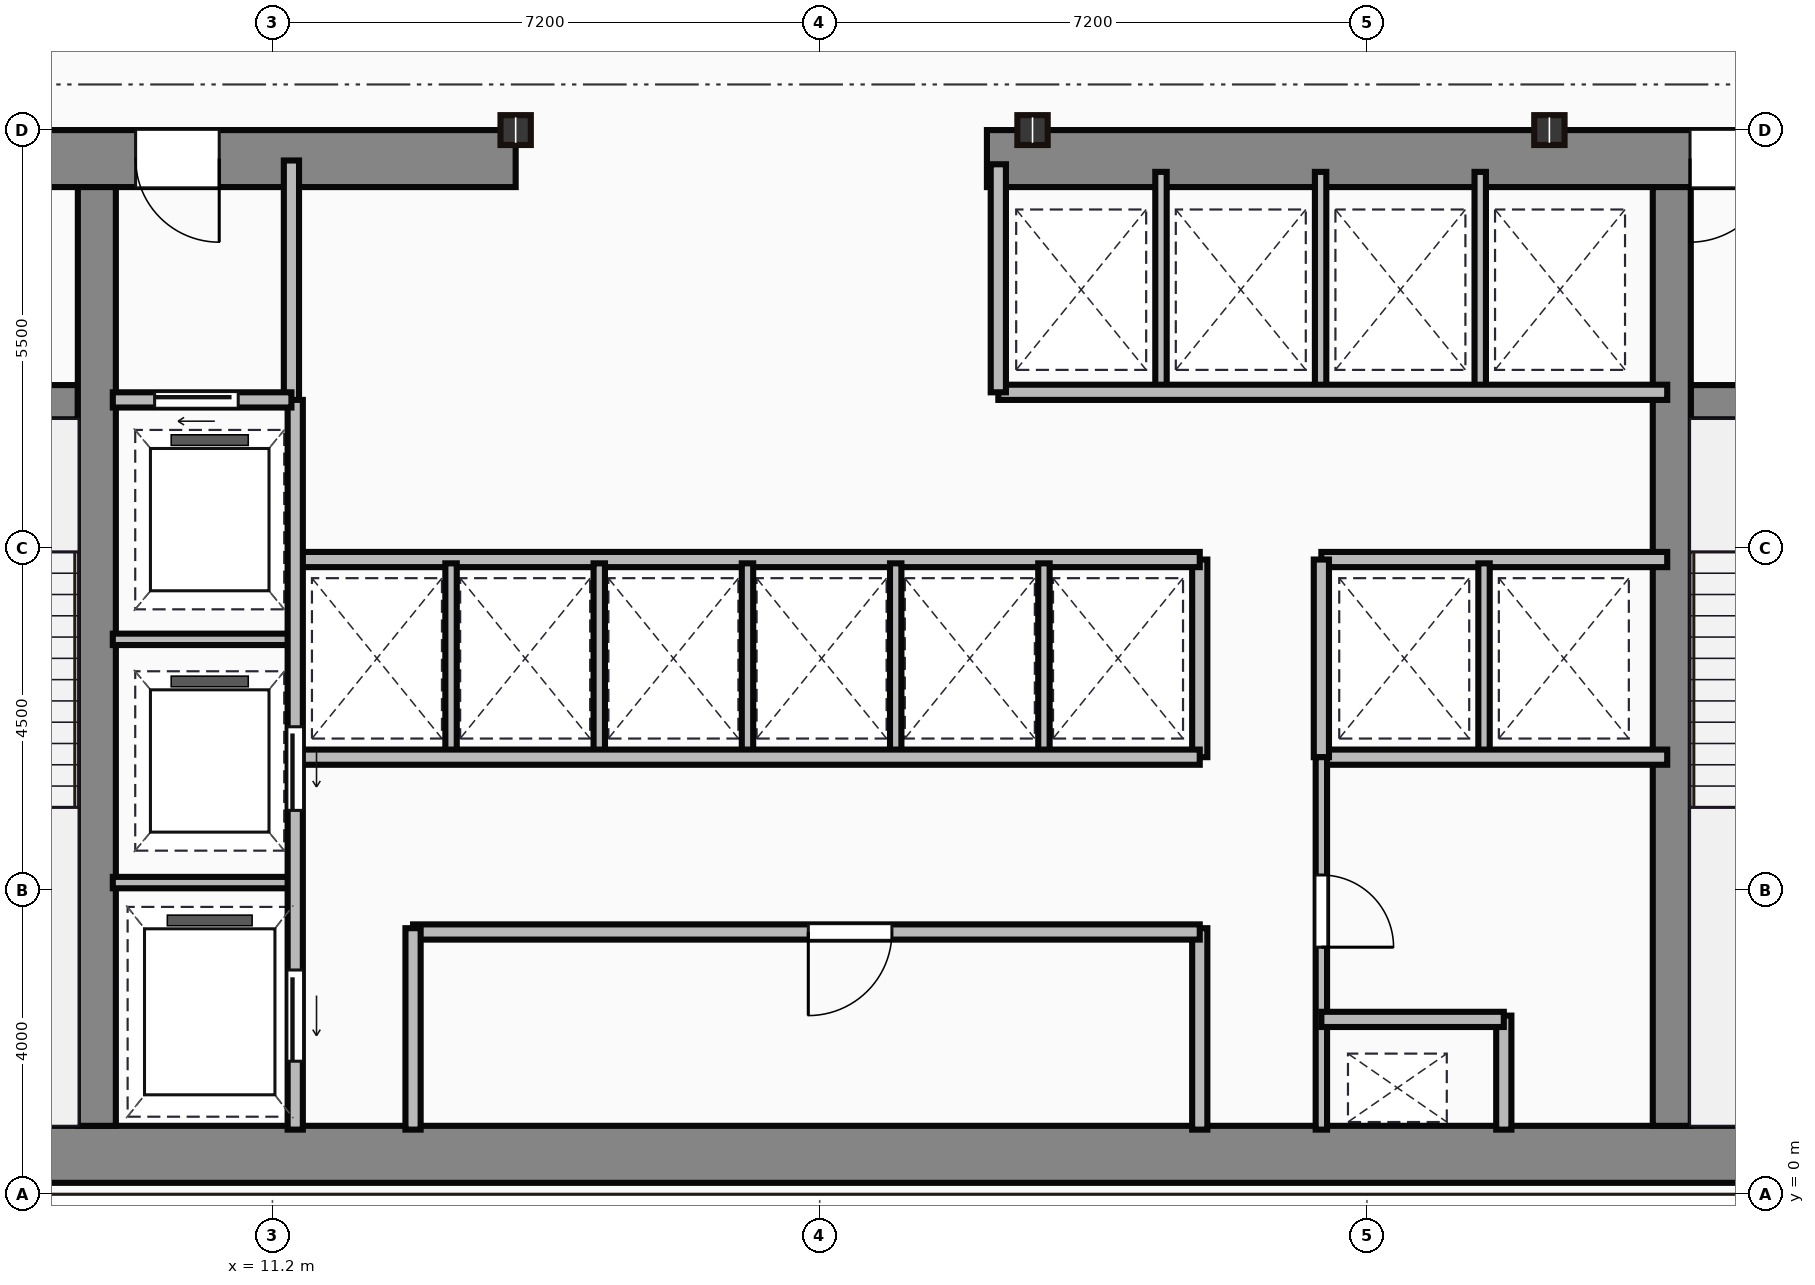
"""IFC4 building model, lengths in metres.
Left out: names, types, materials, properties, quantities, classifications, styles, units other than length and angle.
Written with IfcOpenShell. Run it as: python <this file> out.ifc"""

import sys

from ifc_helpers import new_model, si_unit, direction, frame, frame_2d, origin, origin_2d, place, context, subcontext, project, spatial, rectangle, i_section, extrude, source, transform, mapped, element, fill, save


model = new_model("IFC4")
c1 = context("Model", 3, precision=1e-05, world=origin(), true_north=direction((0.0, 1.0)))
c2 = subcontext(c1, "Body", "Model", "MODEL_VIEW")
j1 = project(units=[si_unit("LENGTHUNIT", "METRE"), si_unit("PLANEANGLEUNIT", "RADIAN")], contexts=[c1])
p1 = place(None, origin())
s1 = spatial("IfcSite", under=j1, at=p1, CompositionType="ELEMENT")
p2 = place(p1, origin())
s2 = spatial("IfcBuilding", under=s1, at=p2, CompositionType="ELEMENT")
p3 = place(p2, frame((0.0, 0.0, 136.1)))
s3 = spatial("IfcBuildingStorey", under=s2, at=p3, CompositionType="ELEMENT", Elevation=136.1)
m1 = source(origin(), c2, "Body", "SweptSolid", [
    extrude(rectangle(XDim=29.5, YDim=0.75, at=frame_2d((14.75, 0.0))), origin(), (0.0, 0.0, 1.0), 4.5),
])
p4 = place(p3, frame((4.5, 0.525, 0.0), z_axis=(0.0, 0.0, 1.0), x_axis=(1.0, 0.0, 0.0)))
e1 = element("IfcWall", 1, at=p4, inside=s3, PredefinedType="SHEAR", context=c2, shape_type="MappedRepresentation", body=[
    mapped(m1, transform((0.0, 0.0, 0.0))),
])
m2 = source(origin(), c2, "Body", "SweptSolid", [
    extrude(rectangle(XDim=9.1, YDim=0.75, at=frame_2d((4.55, 0.0))), origin(), (0.0, 0.0, 1.0), 4.5),
])
p5 = place(p3, frame((5.3, 13.625, 0.0), z_axis=(0.0, 0.0, 1.0), x_axis=(1.0, 0.0, 0.0)))
e2 = element("IfcWall", 2, at=p5, inside=s3, PredefinedType="SHEAR", context=c2, shape_type="MappedRepresentation", body=[
    mapped(m2, transform((0.0, 0.0, 0.0))),
])
p6 = place(p5, frame((4.1, 0.0, 0.0)))
e3 = element("IfcOpeningElement", 3, at=p6, cuts=e2, PredefinedType="OPENING", context=c2, shape_type="SweptSolid", body=[
    extrude(rectangle(XDim=1.1, YDim=2.15, at=frame_2d((0.55, 1.075))), frame((0.0, 0.385, 0.0), z_axis=(0.0, -1.0, 0.0), x_axis=(1.0, 0.0, 0.0)), (0.0, 0.0, 1.0), 0.77),
])
m3 = source(origin(), c2, "Body", "SweptSolid", [
    extrude(rectangle(XDim=12.6, YDim=0.75, at=frame_2d((6.3, 0.0))), origin(), (0.0, 0.0, 1.0), 4.5),
])
p7 = place(p3, frame((20.6, 13.625, 0.0), z_axis=(0.0, 0.0, 1.0), x_axis=(1.0, 0.0, 0.0)))
e4 = element("IfcWall", 4, at=p7, inside=s3, PredefinedType="SHEAR", context=c2, shape_type="MappedRepresentation", body=[
    mapped(m3, transform((0.0, 0.0, 0.0))),
])
p8 = place(p7, frame((9.25, 0.0, 0.0)))
e5 = element("IfcOpeningElement", 5, at=p8, cuts=e4, PredefinedType="OPENING", context=c2, shape_type="SweptSolid", body=[
    extrude(rectangle(XDim=1.1, YDim=2.15, at=frame_2d((0.55, 1.075))), frame((0.0, 0.385, 0.0), z_axis=(0.0, -1.0, 0.0), x_axis=(1.0, 0.0, 0.0)), (0.0, 0.0, 1.0), 0.77),
])
m4 = source(origin(), c2, "Body", "SweptSolid", [
    extrude(rectangle(XDim=12.35, YDim=0.5, at=frame_2d((6.175, 0.0))), origin(), (0.0, 0.0, 1.0), 4.5),
])
for number, where, z_axis, x_axis in (
    (6, (8.89, 0.9, 0.0), (0.0, 0.0, 1.0), (0.0, 1.0, 0.0)),
    (7, (29.61, 0.9, 0.0), (0.0, 0.0, 1.0), (0.0, 1.0, 0.0)),
):
    element("IfcWall", number, at=place(p3, frame(where, z_axis=z_axis, x_axis=x_axis)), inside=s3, PredefinedType="SHEAR", context=c2, shape_type="MappedRepresentation", body=[
        mapped(m4, transform((0.0, 0.0, 0.0))),
    ])
m5 = source(origin(), c2, "Body", "SweptSolid", [
    extrude(rectangle(XDim=3.39, YDim=0.45, at=frame_2d((1.695, 0.0))), origin(), (0.0, 0.0, 1.0), 4.5),
])
p9 = place(p3, frame((5.25, 10.42, 0.0), z_axis=(0.0, 0.0, 1.0), x_axis=(1.0, 0.0, 0.0)))
e8 = element("IfcWall", 8, at=p9, inside=s3, PredefinedType="SHEAR", context=c2, shape_type="MappedRepresentation", body=[
    mapped(m5, transform((0.0, 0.0, 0.0))),
])
p10 = place(p9, frame((1.05, 0.0, 0.0)))
e9 = element("IfcOpeningElement", 9, at=p10, cuts=e8, PredefinedType="OPENING", context=c2, shape_type="SweptSolid", body=[
    extrude(rectangle(XDim=1.1, YDim=2.15, at=frame_2d((0.55, 1.075))), frame((0.0, 0.235, 0.0), z_axis=(0.0, -1.0, 0.0), x_axis=(1.0, 0.0, 0.0)), (0.0, 0.0, 1.0), 0.47),
])
p11 = place(p3, frame((29.86, 10.42, 0.0), z_axis=(0.0, 0.0, 1.0), x_axis=(1.0, 0.0, 0.0)))
e10 = element("IfcWall", 10, at=p11, inside=s3, PredefinedType="SHEAR", context=c2, shape_type="MappedRepresentation", body=[
    mapped(m5, transform((0.0, 0.0, 0.0))),
])
p12 = place(p11, frame((1.1, 0.0, 0.0)))
e11 = element("IfcOpeningElement", 11, at=p12, cuts=e10, PredefinedType="OPENING", context=c2, shape_type="SweptSolid", body=[
    extrude(rectangle(XDim=1.1, YDim=2.15, at=frame_2d((0.55, 1.075))), frame((0.0, 0.235, 0.0), z_axis=(0.0, -1.0, 0.0), x_axis=(1.0, 0.0, 0.0)), (0.0, 0.0, 1.0), 0.47),
])
m6 = source(origin(), c2, "Body", "SweptSolid", [
    extrude(i_section(OverallWidth=0.399, OverallDepth=0.393, WebThickness=0.023, FlangeThickness=0.037, at=origin_2d()), origin(), (0.0, 0.0, 1.0), 4.5),
])
for number, where, z_axis, x_axis in (
    (12, (14.4, 14.0, 0.0), (0.0, 0.0, 1.0), (1.0, 0.0, 0.0)),
    (13, (21.2, 14.0, 0.0), (0.0, 0.0, 1.0), (1.0, 0.0, 0.0)),
    (14, (28.0, 14.0, 0.0), (0.0, 0.0, 1.0), (1.0, 0.0, 0.0)),
):
    element("IfcColumn", number, at=place(p3, frame(where, z_axis=z_axis, x_axis=x_axis)), inside=s3, PredefinedType="COLUMN", context=c2, shape_type="MappedRepresentation", body=[
        mapped(m6, transform((0.0, 0.0, 0.0))),
    ])
m7 = source(origin(), c2, "Body", "SweptSolid", [
    extrude(rectangle(XDim=3.18, YDim=0.2, at=frame_2d((1.59, 0.0))), origin(), (0.0, 0.0, 1.0), 4.25),
])
p13 = place(p3, frame((11.45, 10.42, 0.0), z_axis=(0.0, 0.0, 1.0), x_axis=(0.0, 1.0, 0.0)))
e15 = element("IfcWall", 15, at=p13, inside=s3, PredefinedType="PARTITIONING", context=c2, shape_type="MappedRepresentation", body=[
    mapped(m7, transform((0.0, 0.0, 0.0))),
])
m8 = source(origin(), c2, "Body", "SweptSolid", [
    extrude(rectangle(XDim=2.35, YDim=0.2, at=frame_2d((1.175, 0.0))), origin(), (0.0, 0.0, 1.0), 4.25),
])
p14 = place(p3, frame((9.1, 10.45, 0.0), z_axis=(0.0, 0.0, 1.0), x_axis=(1.0, 0.0, 0.0)))
e16 = element("IfcWall", 16, at=p14, inside=s3, PredefinedType="PARTITIONING", context=c2, shape_type="MappedRepresentation", body=[
    mapped(m8, transform((0.0, 0.0, 0.0))),
])
p15 = place(p14, frame((0.55, 0.0, 0.0)))
e17 = element("IfcOpeningElement", 17, at=p15, cuts=e16, PredefinedType="OPENING", context=c2, shape_type="SweptSolid", body=[
    extrude(rectangle(XDim=1.1, YDim=2.15, at=frame_2d((0.55, 1.075))), frame((0.0, 0.11, 0.0), z_axis=(0.0, -1.0, 0.0), x_axis=(1.0, 0.0, 0.0)), (0.0, 0.0, 1.0), 0.22),
])
m9 = source(origin(), c2, "Body", "SweptSolid", [
    extrude(rectangle(XDim=9.6, YDim=0.2, at=frame_2d((4.8, 0.0))), origin(), (0.0, 0.0, 1.0), 4.25),
])
p16 = place(p3, frame((11.5, 0.85, 0.0), z_axis=(0.0, 0.0, 1.0), x_axis=(0.0, 1.0, 0.0)))
e18 = element("IfcWall", 18, at=p16, inside=s3, PredefinedType="PARTITIONING", context=c2, shape_type="MappedRepresentation", body=[
    mapped(m9, transform((0.0, 0.0, 0.0))),
])
p17 = place(p16, frame((4.2, 0.0, 0.0)))
e19 = element("IfcOpeningElement", 19, at=p17, cuts=e18, PredefinedType="OPENING", context=c2, shape_type="SweptSolid", body=[
    extrude(rectangle(XDim=1.1, YDim=2.15, at=frame_2d((0.55, 1.075))), frame((0.0, 0.11, 0.0), z_axis=(0.0, -1.0, 0.0), x_axis=(1.0, 0.0, 0.0)), (0.0, 0.0, 1.0), 0.22),
])
p18 = place(p16, frame((0.9, 0.0, 0.0)))
e20 = element("IfcOpeningElement", 20, at=p18, cuts=e18, PredefinedType="OPENING", context=c2, shape_type="SweptSolid", body=[
    extrude(rectangle(XDim=1.2, YDim=2.15, at=frame_2d((0.6, 1.075))), frame((0.0, 0.11, 0.0), z_axis=(0.0, -1.0, 0.0), x_axis=(1.0, 0.0, 0.0)), (0.0, 0.0, 1.0), 0.22),
])
m10 = source(origin(), c2, "Body", "SweptSolid", [
    extrude(rectangle(XDim=2.4, YDim=0.15, at=frame_2d((1.2, 0.0))), origin(), (0.0, 0.0, 1.0), 4.25),
])
for number, where, z_axis, x_axis in (
    (21, (9.1, 4.1, 0.0), (0.0, 0.0, 1.0), (1.0, 0.0, 0.0)),
    (22, (9.1, 7.3, 0.0), (0.0, 0.0, 1.0), (1.0, 0.0, 0.0)),
):
    element("IfcWall", number, at=place(p3, frame(where, z_axis=z_axis, x_axis=x_axis)), inside=s3, PredefinedType="PARTITIONING", context=c2, shape_type="MappedRepresentation", body=[
        mapped(m10, transform((0.0, 0.0, 0.0))),
    ])
m11 = source(origin(), c2, "Body", "SweptSolid", [
    extrude(rectangle(XDim=2.65, YDim=0.2, at=frame_2d((1.325, 0.0))), origin(), (0.0, 0.0, 1.0), 4.25),
])
p19 = place(p3, frame((13.05, 0.85, 0.0), z_axis=(0.0, 0.0, 1.0), x_axis=(0.0, 1.0, 0.0)))
e23 = element("IfcWall", 23, at=p19, inside=s3, PredefinedType="PARTITIONING", context=c2, shape_type="MappedRepresentation", body=[
    mapped(m11, transform((0.0, 0.0, 0.0))),
])
m12 = source(origin(), c2, "Body", "SweptSolid", [
    extrude(rectangle(XDim=10.35, YDim=0.2, at=frame_2d((5.175, 0.0))), origin(), (0.0, 0.0, 1.0), 4.25),
])
p20 = place(p3, frame((13.05, 3.45, 0.0), z_axis=(0.0, 0.0, 1.0), x_axis=(1.0, 0.0, 0.0)))
e24 = element("IfcWall", 24, at=p20, inside=s3, PredefinedType="PARTITIONING", context=c2, shape_type="MappedRepresentation", body=[
    mapped(m12, transform((0.0, 0.0, 0.0))),
])
p21 = place(p20, frame((5.2, 0.0, 0.0)))
e25 = element("IfcOpeningElement", 25, at=p21, cuts=e24, PredefinedType="OPENING", context=c2, shape_type="SweptSolid", body=[
    extrude(rectangle(XDim=1.1, YDim=2.15, at=frame_2d((0.55, 1.075))), frame((0.0, 0.11, 0.0), z_axis=(0.0, -1.0, 0.0), x_axis=(1.0, 0.0, 0.0)), (0.0, 0.0, 1.0), 0.22),
])
p22 = place(p3, frame((23.4, 0.85, 0.0), z_axis=(0.0, 0.0, 1.0), x_axis=(0.0, 1.0, 0.0)))
e26 = element("IfcWall", 26, at=p22, inside=s3, PredefinedType="PARTITIONING", context=c2, shape_type="MappedRepresentation", body=[
    mapped(m11, transform((0.0, 0.0, 0.0))),
])
m13 = source(origin(), c2, "Body", "SweptSolid", [
    extrude(rectangle(XDim=11.85, YDim=0.2, at=frame_2d((5.925, 0.0))), origin(), (0.0, 0.0, 1.0), 4.25),
])
for number, where, z_axis, x_axis in (
    (27, (11.55, 5.75, 0.0), (0.0, 0.0, 1.0), (1.0, 0.0, 0.0)),
    (28, (11.55, 8.35, 0.0), (0.0, 0.0, 1.0), (1.0, 0.0, 0.0)),
):
    element("IfcWall", number, at=place(p3, frame(where, z_axis=z_axis, x_axis=x_axis)), inside=s3, PredefinedType="PARTITIONING", context=c2, shape_type="MappedRepresentation", body=[
        mapped(m13, transform((0.0, 0.0, 0.0))),
    ])
m14 = source(origin(), c2, "Body", "SweptSolid", [
    extrude(rectangle(XDim=2.6, YDim=0.2, at=frame_2d((1.3, 0.0))), origin(), (0.0, 0.0, 1.0), 4.25),
])
p23 = place(p3, frame((23.4, 5.75, 0.0), z_axis=(0.0, 0.0, 1.0), x_axis=(0.0, 1.0, 0.0)))
e29 = element("IfcWall", 29, at=p23, inside=s3, PredefinedType="PARTITIONING", context=c2, shape_type="MappedRepresentation", body=[
    mapped(m14, transform((0.0, 0.0, 0.0))),
])
m15 = source(origin(), c2, "Body", "SweptSolid", [
    extrude(rectangle(XDim=2.5, YDim=0.15, at=frame_2d((1.25, 0.0))), origin(), (0.0, 0.0, 1.0), 4.25),
])
for number, where, z_axis, x_axis in (
    (30, (13.55, 5.8, 0.0), (0.0, 0.0, 1.0), (0.0, 1.0, 0.0)),
    (31, (15.5, 5.8, 0.0), (0.0, 0.0, 1.0), (0.0, 1.0, 0.0)),
    (32, (17.45, 5.8, 0.0), (0.0, 0.0, 1.0), (0.0, 1.0, 0.0)),
    (33, (19.4, 5.8, 0.0), (0.0, 0.0, 1.0), (0.0, 1.0, 0.0)),
    (34, (21.35, 5.8, 0.0), (0.0, 0.0, 1.0), (0.0, 1.0, 0.0)),
):
    element("IfcWall", number, at=place(p3, frame(where, z_axis=z_axis, x_axis=x_axis)), inside=s3, PredefinedType="PARTITIONING", context=c2, shape_type="MappedRepresentation", body=[
        mapped(m15, transform((0.0, 0.0, 0.0))),
    ])
m16 = source(origin(), c2, "Body", "SweptSolid", [
    extrude(rectangle(XDim=8.8, YDim=0.2, at=frame_2d((4.4, 0.0))), origin(), (0.0, 0.0, 1.0), 4.25),
])
p24 = place(p3, frame((20.75, 10.55, 0.0), z_axis=(0.0, 0.0, 1.0), x_axis=(1.0, 0.0, 0.0)))
e35 = element("IfcWall", 35, at=p24, inside=s3, PredefinedType="PARTITIONING", context=c2, shape_type="MappedRepresentation", body=[
    mapped(m16, transform((0.0, 0.0, 0.0))),
])
m17 = source(origin(), c2, "Body", "SweptSolid", [
    extrude(rectangle(XDim=3.0, YDim=0.2, at=frame_2d((1.5, 0.0))), origin(), (0.0, 0.0, 1.0), 4.25),
])
p25 = place(p3, frame((20.75, 10.55, 0.0), z_axis=(0.0, 0.0, 1.0), x_axis=(0.0, 1.0, 0.0)))
e36 = element("IfcWall", 36, at=p25, inside=s3, PredefinedType="PARTITIONING", context=c2, shape_type="MappedRepresentation", body=[
    mapped(m17, transform((0.0, 0.0, 0.0))),
])
m18 = source(origin(), c2, "Body", "SweptSolid", [
    extrude(rectangle(XDim=2.85, YDim=0.15, at=frame_2d((1.425, 0.0))), origin(), (0.0, 0.0, 1.0), 4.25),
])
for number, where, z_axis, x_axis in (
    (37, (22.89, 10.6, 0.0), (0.0, 0.0, 1.0), (0.0, 1.0, 0.0)),
    (38, (24.99, 10.6, 0.0), (0.0, 0.0, 1.0), (0.0, 1.0, 0.0)),
    (39, (27.09, 10.6, 0.0), (0.0, 0.0, 1.0), (0.0, 1.0, 0.0)),
):
    element("IfcWall", number, at=place(p3, frame(where, z_axis=z_axis, x_axis=x_axis)), inside=s3, PredefinedType="PARTITIONING", context=c2, shape_type="MappedRepresentation", body=[
        mapped(m18, transform((0.0, 0.0, 0.0))),
    ])
m19 = source(origin(), c2, "Body", "SweptSolid", [
    extrude(rectangle(XDim=4.55, YDim=0.2, at=frame_2d((2.275, 0.0))), origin(), (0.0, 0.0, 1.0), 4.25),
])
for number, where, z_axis, x_axis in (
    (40, (25.0, 8.35, 0.0), (0.0, 0.0, 1.0), (1.0, 0.0, 0.0)),
    (41, (25.0, 5.75, 0.0), (0.0, 0.0, 1.0), (1.0, 0.0, 0.0)),
):
    element("IfcWall", number, at=place(p3, frame(where, z_axis=z_axis, x_axis=x_axis)), inside=s3, PredefinedType="PARTITIONING", context=c2, shape_type="MappedRepresentation", body=[
        mapped(m19, transform((0.0, 0.0, 0.0))),
    ])
p26 = place(p3, frame((25.0, 5.75, 0.0), z_axis=(0.0, 0.0, 1.0), x_axis=(0.0, 1.0, 0.0)))
e42 = element("IfcWall", 42, at=p26, inside=s3, PredefinedType="PARTITIONING", context=c2, shape_type="MappedRepresentation", body=[
    mapped(m14, transform((0.0, 0.0, 0.0))),
])
p27 = place(p3, frame((27.14, 5.8, 0.0), z_axis=(0.0, 0.0, 1.0), x_axis=(0.0, 1.0, 0.0)))
e43 = element("IfcWall", 43, at=p27, inside=s3, PredefinedType="PARTITIONING", context=c2, shape_type="MappedRepresentation", body=[
    mapped(m15, transform((0.0, 0.0, 0.0))),
])
m20 = source(origin(), c2, "Body", "SweptSolid", [
    extrude(rectangle(XDim=4.9, YDim=0.15, at=frame_2d((2.45, 0.0))), origin(), (0.0, 0.0, 1.0), 4.25),
])
p28 = place(p3, frame((25.0, 0.85, 0.0), z_axis=(0.0, 0.0, 1.0), x_axis=(0.0, 1.0, 0.0)))
e44 = element("IfcWall", 44, at=p28, inside=s3, PredefinedType="PARTITIONING", context=c2, shape_type="MappedRepresentation", body=[
    mapped(m20, transform((0.0, 0.0, 0.0))),
])
p29 = place(p28, frame((2.4, 0.0, 0.0)))
e45 = element("IfcOpeningElement", 45, at=p29, cuts=e44, PredefinedType="OPENING", context=c2, shape_type="SweptSolid", body=[
    extrude(rectangle(XDim=0.95, YDim=2.15, at=frame_2d((0.475, 1.075))), frame((0.0, 0.085, 0.0), z_axis=(0.0, -1.0, 0.0), x_axis=(1.0, 0.0, 0.0)), (0.0, 0.0, 1.0), 0.17),
])
m21 = source(origin(), c2, "Body", "SweptSolid", [
    extrude(rectangle(XDim=2.4, YDim=0.2, at=frame_2d((1.2, 0.0))), origin(), (0.0, 0.0, 1.0), 4.25),
])
p30 = place(p3, frame((25.0, 2.3, 0.0), z_axis=(0.0, 0.0, 1.0), x_axis=(1.0, 0.0, 0.0)))
e46 = element("IfcWall", 46, at=p30, inside=s3, PredefinedType="PARTITIONING", context=c2, shape_type="MappedRepresentation", body=[
    mapped(m21, transform((0.0, 0.0, 0.0))),
])
m22 = source(origin(), c2, "Body", "SweptSolid", [
    extrude(rectangle(XDim=1.5, YDim=0.2, at=frame_2d((0.75, 0.0))), origin(), (0.0, 0.0, 1.0), 4.25),
])
p31 = place(p3, frame((27.4, 0.85, 0.0), z_axis=(0.0, 0.0, 1.0), x_axis=(0.0, 1.0, 0.0)))
e47 = element("IfcWall", 47, at=p31, inside=s3, PredefinedType="PARTITIONING", context=c2, shape_type="MappedRepresentation", body=[
    mapped(m22, transform((0.0, 0.0, 0.0))),
])
m23 = source(origin(), c2, "Body", "SweptSolid", [
    extrude(rectangle(XDim=1.1, YDim=2.15, at=frame_2d((0.55, 1.075))), frame((0.0, 0.025, 0.0), z_axis=(0.0, -1.0, 0.0), x_axis=(1.0, 0.0, 0.0)), (0.0, 0.0, 1.0), 0.05),
])
p32 = place(p6, origin())
e48 = element("IfcDoor", 48, at=p32, inside=s3, OperationType="SINGLE_SWING_RIGHT", PredefinedType="DOOR", context=c2, shape_type="MappedRepresentation", body=[
    mapped(m23, transform((0.0, 0.0, 0.0))),
])
fill(e3, e48)
p33 = place(p8, origin())
e49 = element("IfcDoor", 49, at=p33, inside=s3, OperationType="SINGLE_SWING_LEFT", PredefinedType="DOOR", context=c2, shape_type="MappedRepresentation", body=[
    mapped(m23, transform((0.0, 0.0, 0.0))),
])
fill(e5, e49)
p34 = place(p15, origin())
e50 = element("IfcDoor", 50, at=p34, inside=s3, OperationType="SLIDING_TO_LEFT", PredefinedType="DOOR", context=c2, shape_type="MappedRepresentation", body=[
    mapped(m23, transform((0.0, 0.0, 0.0))),
])
fill(e17, e50)
p35 = place(p17, frame((1.1, 0.0, 0.0), z_axis=(0.0, 0.0, 1.0), x_axis=(-1.0, 0.0, 0.0)))
e51 = element("IfcDoor", 51, at=p35, inside=s3, OperationType="SLIDING_TO_LEFT", PredefinedType="DOOR", context=c2, shape_type="MappedRepresentation", body=[
    mapped(m23, transform((0.0, 0.0, 0.0))),
])
fill(e19, e51)
m24 = source(origin(), c2, "Body", "SweptSolid", [
    extrude(rectangle(XDim=1.2, YDim=2.15, at=frame_2d((0.6, 1.075))), frame((0.0, 0.025, 0.0), z_axis=(0.0, -1.0, 0.0), x_axis=(1.0, 0.0, 0.0)), (0.0, 0.0, 1.0), 0.05),
])
p36 = place(p18, frame((1.2, 0.0, 0.0), z_axis=(0.0, 0.0, 1.0), x_axis=(-1.0, 0.0, 0.0)))
e52 = element("IfcDoor", 52, at=p36, inside=s3, OperationType="SLIDING_TO_LEFT", PredefinedType="DOOR", context=c2, shape_type="MappedRepresentation", body=[
    mapped(m24, transform((0.0, 0.0, 0.0))),
])
fill(e20, e52)
p37 = place(p21, origin())
e53 = element("IfcDoor", 53, at=p37, inside=s3, OperationType="SINGLE_SWING_LEFT", PredefinedType="DOOR", context=c2, shape_type="MappedRepresentation", body=[
    mapped(m23, transform((0.0, 0.0, 0.0))),
])
fill(e25, e53)
m25 = source(origin(), c2, "Body", "SweptSolid", [
    extrude(rectangle(XDim=0.95, YDim=2.15, at=frame_2d((0.475, 1.075))), frame((0.0, 0.025, 0.0), z_axis=(0.0, -1.0, 0.0), x_axis=(1.0, 0.0, 0.0)), (0.0, 0.0, 1.0), 0.05),
])
p38 = place(p29, origin())
e54 = element("IfcDoor", 54, at=p38, inside=s3, OperationType="SINGLE_SWING_LEFT", PredefinedType="DOOR", context=c2, shape_type="MappedRepresentation", body=[
    mapped(m25, transform((0.0, 0.0, 0.0))),
])
fill(e45, e54)
save(model, sys.argv[1])
